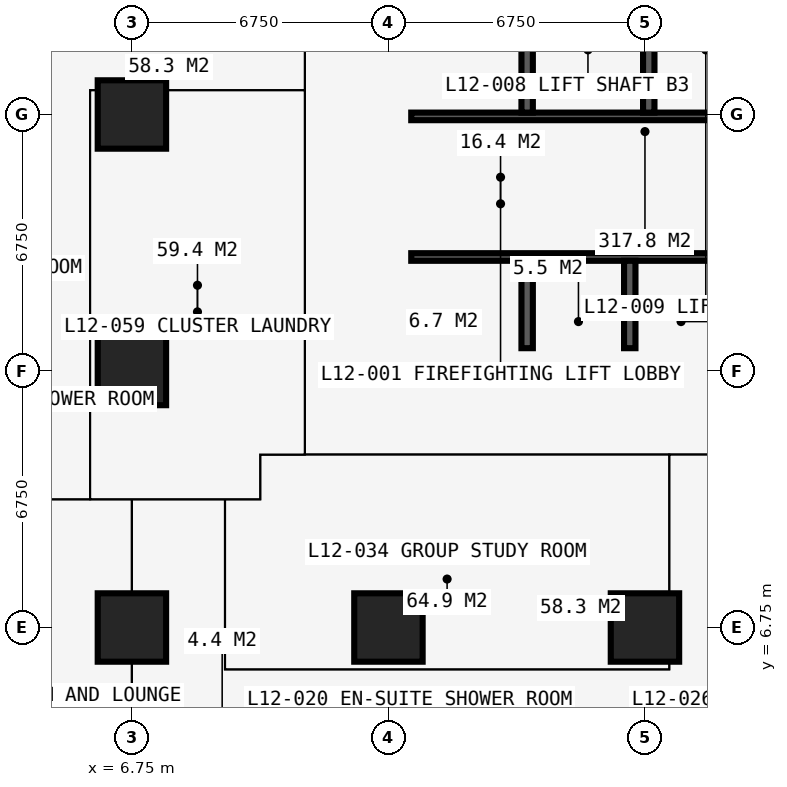
"""IFC4 building model, lengths in metres.
Left out: names, types, materials, properties, quantities, classifications, styles, units other than length and angle.
Written with IfcOpenShell. Run it as: python <this file> out.ifc"""

import sys

from ifc_helpers import new_model, si_unit, direction, frame, frame_2d, origin, origin_2d, place, context, subcontext, project, spatial, rectangle, extrude, element, fill, save


model = new_model("IFC4")
c1 = context("Model", 3, precision=1e-05, world=origin(), true_north=direction((0.0, 1.0)))
c2 = subcontext(c1, "Body", "Model", "MODEL_VIEW")
j1 = project(units=[si_unit("LENGTHUNIT", "METRE"), si_unit("PLANEANGLEUNIT", "RADIAN")], contexts=[c1])
p1 = place(None, origin())
s1 = spatial("IfcSite", under=j1, at=p1, CompositionType="ELEMENT")
p2 = place(p1, origin())
s2 = spatial("IfcBuilding", under=s1, at=p2, CompositionType="ELEMENT")
p3 = place(p2, frame((0.0, 0.0, 46.8)))
s3 = spatial("IfcBuildingStorey", under=s2, at=p3, CompositionType="ELEMENT", Elevation=46.8)
for number, where, z_axis, x_axis in (
    (1, (6.75, 6.75, 0.0), (0.0, 0.0, 1.0), (1.0, 0.0, 0.0)),
    (2, (6.75, 13.5, 0.0), (0.0, 0.0, 1.0), (1.0, 0.0, 0.0)),
    (3, (6.75, 20.25, 0.0), (0.0, 0.0, 1.0), (1.0, 0.0, 0.0)),
    (4, (13.5, 6.75, 0.0), (0.0, 0.0, 1.0), (1.0, 0.0, 0.0)),
    (5, (20.25, 6.75, 0.0), (0.0, 0.0, 1.0), (1.0, 0.0, 0.0)),
):
    element("IfcColumn", number, at=place(p3, frame(where, z_axis=z_axis, x_axis=x_axis)), inside=s3, PredefinedType="COLUMN", context=c2, shape_type="SweptSolid", body=[
        extrude(rectangle(XDim=1.8, YDim=1.8, at=origin_2d()), origin(), (0.0, 0.0, 1.0), 3.6),
    ])
p4 = place(p3, frame((12.9, 13.5, 0.0), z_axis=(0.0, 0.0, 1.0), x_axis=(1.0, 0.0, 0.0)))
e6 = element("IfcWall", 6, at=p4, inside=s3, PredefinedType="SHEAR", context=c2, shape_type="SweptSolid", body=[
    extrude(rectangle(XDim=14.7, YDim=1.2, at=frame_2d((7.35, 0.0))), origin(), (0.0, 0.0, 1.0), 3.6),
])
p5 = place(p3, frame((13.5, 26.4, 0.0), z_axis=(0.0, 0.0, 1.0), x_axis=(0.0, -1.0, 0.0)))
e7 = element("IfcWall", 7, at=p5, inside=s3, PredefinedType="SHEAR", context=c2, shape_type="SweptSolid", body=[
    extrude(rectangle(XDim=12.3, YDim=1.2, at=frame_2d((6.15, 0.0))), origin(), (0.0, 0.0, 1.0), 3.6),
])
p6 = place(p5, frame((7.45, 0.0, 0.0)))
e8 = element("IfcOpeningElement", 8, at=p6, cuts=e7, PredefinedType="OPENING", context=c2, shape_type="SweptSolid", body=[
    extrude(rectangle(XDim=1.2, YDim=2.2, at=frame_2d((0.6, 1.1))), frame((0.0, 0.61, 0.0), z_axis=(0.0, -1.0, 0.0), x_axis=(1.0, 0.0, 0.0)), (0.0, 0.0, 1.0), 1.22),
])
p7 = place(p3, frame((14.1, 16.5, 0.0), z_axis=(0.0, 0.0, 1.0), x_axis=(1.0, 0.0, 0.0)))
e9 = element("IfcWall", 9, at=p7, inside=s3, PredefinedType="SHEAR", context=c2, shape_type="SweptSolid", body=[
    extrude(rectangle(XDim=12.3, YDim=0.2, at=frame_2d((6.15, 0.0))), origin(), (0.0, 0.0, 1.0), 3.6),
])
p8 = place(p7, frame((0.9, 0.0, 0.0)))
e10 = element("IfcOpeningElement", 10, at=p8, cuts=e9, PredefinedType="OPENING", context=c2, shape_type="SweptSolid", body=[
    extrude(rectangle(XDim=1.1, YDim=2.2, at=frame_2d((0.55, 1.1))), frame((0.0, 0.11, 0.0), z_axis=(0.0, -1.0, 0.0), x_axis=(1.0, 0.0, 0.0)), (0.0, 0.0, 1.0), 0.22),
])
p9 = place(p7, frame((9.5, 0.0, 0.0)))
e11 = element("IfcOpeningElement", 11, at=p9, cuts=e9, PredefinedType="OPENING", context=c2, shape_type="SweptSolid", body=[
    extrude(rectangle(XDim=1.1, YDim=2.2, at=frame_2d((0.55, 1.1))), frame((0.0, 0.11, 0.0), z_axis=(0.0, -1.0, 0.0), x_axis=(1.0, 0.0, 0.0)), (0.0, 0.0, 1.0), 0.22),
])
p10 = place(p3, frame((14.1, 20.2, 0.0), z_axis=(0.0, 0.0, 1.0), x_axis=(1.0, 0.0, 0.0)))
e12 = element("IfcWall", 12, at=p10, inside=s3, PredefinedType="SHEAR", context=c2, shape_type="SweptSolid", body=[
    extrude(rectangle(XDim=12.3, YDim=0.2, at=frame_2d((6.15, 0.0))), origin(), (0.0, 0.0, 1.0), 3.6),
])
p11 = place(p10, frame((0.35, 0.0, 0.0)))
e13 = element("IfcOpeningElement", 13, at=p11, cuts=e12, PredefinedType="OPENING", context=c2, shape_type="SweptSolid", body=[
    extrude(rectangle(XDim=1.1, YDim=2.2, at=frame_2d((0.55, 1.1))), frame((0.0, 0.11, 0.0), z_axis=(0.0, -1.0, 0.0), x_axis=(1.0, 0.0, 0.0)), (0.0, 0.0, 1.0), 0.22),
])
p12 = place(p10, frame((9.75, 0.0, 0.0)))
e14 = element("IfcOpeningElement", 14, at=p12, cuts=e12, PredefinedType="OPENING", context=c2, shape_type="SweptSolid", body=[
    extrude(rectangle(XDim=1.1, YDim=2.2, at=frame_2d((0.55, 1.1))), frame((0.0, 0.11, 0.0), z_axis=(0.0, -1.0, 0.0), x_axis=(1.0, 0.0, 0.0)), (0.0, 0.0, 1.0), 0.22),
])
p13 = place(p3, frame((17.15, 20.3, 0.0), z_axis=(0.0, 0.0, 1.0), x_axis=(0.0, 1.0, 0.0)))
e15 = element("IfcWall", 15, at=p13, inside=s3, PredefinedType="SHEAR", context=c2, shape_type="SweptSolid", body=[
    extrude(rectangle(XDim=6.1, YDim=0.3, at=frame_2d((3.05, 0.0))), origin(), (0.0, 0.0, 1.0), 3.6),
])
p14 = place(p3, frame((20.35, 20.3, 0.0), z_axis=(0.0, 0.0, 1.0), x_axis=(0.0, 1.0, 0.0)))
e16 = element("IfcWall", 16, at=p14, inside=s3, PredefinedType="SHEAR", context=c2, shape_type="SweptSolid", body=[
    extrude(rectangle(XDim=2.8, YDim=0.3, at=frame_2d((1.4, 0.0))), origin(), (0.0, 0.0, 1.0), 3.6),
])
for number, where, z_axis, x_axis in (
    (17, (17.15, 14.1, 0.0), (0.0, 0.0, 1.0), (0.0, 1.0, 0.0)),
    (18, (19.85, 14.1, 0.0), (0.0, 0.0, 1.0), (0.0, 1.0, 0.0)),
):
    element("IfcWall", number, at=place(p3, frame(where, z_axis=z_axis, x_axis=x_axis)), inside=s3, PredefinedType="SHEAR", context=c2, shape_type="SweptSolid", body=[
        extrude(rectangle(XDim=2.3, YDim=0.3, at=frame_2d((1.15, 0.0))), origin(), (0.0, 0.0, 1.0), 3.6),
    ])
p15 = place(p3, frame((18.875, 16.6, 0.0), z_axis=(0.0, 0.0, 1.0), x_axis=(0.0, 1.0, 0.0)))
e19 = element("IfcWall", 19, at=p15, inside=s3, PredefinedType="PARTITIONING", context=c2, shape_type="SweptSolid", body=[
    extrude(rectangle(XDim=3.5, YDim=0.15, at=frame_2d((1.75, 0.0))), origin(), (0.0, 0.0, 1.0), 3.375),
])
p16 = place(p15, frame((1.15, 0.0, 0.0)))
e20 = element("IfcOpeningElement", 20, at=p16, cuts=e19, PredefinedType="OPENING", context=c2, shape_type="SweptSolid", body=[
    extrude(rectangle(XDim=1.2, YDim=2.2, at=frame_2d((0.6, 1.1))), frame((0.0, 0.085, 0.0), z_axis=(0.0, -1.0, 0.0), x_axis=(1.0, 0.0, 0.0)), (0.0, 0.0, 1.0), 0.17),
])
p17 = place(p3, frame((21.625, 16.6, 0.0), z_axis=(0.0, 0.0, 1.0), x_axis=(0.0, 1.0, 0.0)))
e21 = element("IfcWall", 21, at=p17, inside=s3, PredefinedType="PARTITIONING", context=c2, shape_type="SweptSolid", body=[
    extrude(rectangle(XDim=3.5, YDim=0.15, at=frame_2d((1.75, 0.0))), origin(), (0.0, 0.0, 1.0), 3.375),
])
p18 = place(p17, frame((1.15, 0.0, 0.0)))
e22 = element("IfcOpeningElement", 22, at=p18, cuts=e21, PredefinedType="OPENING", context=c2, shape_type="SweptSolid", body=[
    extrude(rectangle(XDim=1.2, YDim=2.2, at=frame_2d((0.6, 1.1))), frame((0.0, 0.085, 0.0), z_axis=(0.0, -1.0, 0.0), x_axis=(1.0, 0.0, 0.0)), (0.0, 0.0, 1.0), 0.17),
])
p19 = place(p3, frame((-0.734, 10.125, 0.0), z_axis=(0.0, 0.0, 1.0), x_axis=(1.0, 0.0, 0.0)))
e23 = element("IfcWall", 23, at=p19, inside=s3, PredefinedType="PARTITIONING", context=c2, shape_type="SweptSolid", body=[
    extrude(rectangle(XDim=10.859, YDim=0.15, at=frame_2d((5.429, 0.0))), origin(), (0.0, 0.0, 1.0), 3.375),
])
p20 = place(p19, frame((5.134, 0.0, 0.0)))
e24 = element("IfcOpeningElement", 24, at=p20, cuts=e23, PredefinedType="OPENING", context=c2, shape_type="SweptSolid", body=[
    extrude(rectangle(XDim=1.0, YDim=2.2, at=frame_2d((0.5, 1.1))), frame((0.0, 0.085, 0.0), z_axis=(0.0, -1.0, 0.0), x_axis=(1.0, 0.0, 0.0)), (0.0, 0.0, 1.0), 0.17),
])
p21 = place(p19, frame((8.234, 0.0, 0.0)))
e25 = element("IfcOpeningElement", 25, at=p21, cuts=e23, PredefinedType="OPENING", context=c2, shape_type="SweptSolid", body=[
    extrude(rectangle(XDim=0.95, YDim=2.2, at=frame_2d((0.475, 1.1))), frame((0.0, 0.085, 0.0), z_axis=(0.0, -1.0, 0.0), x_axis=(1.0, 0.0, 0.0)), (0.0, 0.0, 1.0), 0.17),
])
p22 = place(p3, frame((5.65, 10.125, 0.0), z_axis=(0.0, 0.0, 1.0), x_axis=(0.0, 1.0, 0.0)))
e26 = element("IfcWall", 26, at=p22, inside=s3, PredefinedType="PARTITIONING", context=c2, shape_type="SweptSolid", body=[
    extrude(rectangle(XDim=10.762, YDim=0.15, at=frame_2d((5.381, 0.0))), origin(), (0.0, 0.0, 1.0), 3.375),
])
p23 = place(p3, frame((5.65, 20.887, 0.0), z_axis=(0.0, 0.0, 1.0), x_axis=(1.0, 0.0, 0.0)))
e27 = element("IfcWall", 27, at=p23, inside=s3, PredefinedType="PARTITIONING", context=c2, shape_type="SweptSolid", body=[
    extrude(rectangle(XDim=5.65, YDim=0.15, at=frame_2d((2.825, 0.0))), origin(), (0.0, 0.0, 1.0), 3.375),
])
p24 = place(p3, frame((6.75, -0.734, 0.0), z_axis=(0.0, 0.0, 1.0), x_axis=(0.0, 1.0, 0.0)))
e28 = element("IfcWall", 28, at=p24, inside=s3, PredefinedType="PARTITIONING", context=c2, shape_type="SweptSolid", body=[
    extrude(rectangle(XDim=10.859, YDim=0.15, at=frame_2d((5.429, 0.0))), origin(), (0.0, 0.0, 1.0), 2.877),
])
p25 = place(p3, frame((9.2, 5.65, 0.0), z_axis=(0.0, 0.0, 1.0), x_axis=(0.0, 1.0, 0.0)))
e29 = element("IfcWall", 29, at=p25, inside=s3, PredefinedType="PARTITIONING", context=c2, shape_type="SweptSolid", body=[
    extrude(rectangle(XDim=4.475, YDim=0.15, at=frame_2d((2.238, 0.0))), origin(), (0.0, 0.0, 1.0), 3.375),
])
p26 = place(p3, frame((9.2, 5.65, 0.0), z_axis=(0.0, 0.0, 1.0), x_axis=(1.0, 0.0, 0.0)))
e30 = element("IfcWall", 30, at=p26, inside=s3, PredefinedType="PARTITIONING", context=c2, shape_type="SweptSolid", body=[
    extrude(rectangle(XDim=11.688, YDim=0.15, at=frame_2d((5.844, 0.0))), origin(), (0.0, 0.0, 1.0), 3.375),
])
p27 = place(p26, frame((5.35, 0.0, 0.0)))
e31 = element("IfcOpeningElement", 31, at=p27, cuts=e30, PredefinedType="OPENING", context=c2, shape_type="SweptSolid", body=[
    extrude(rectangle(XDim=0.95, YDim=2.2, at=frame_2d((0.475, 1.1))), frame((0.0, 0.085, 0.0), z_axis=(0.0, -1.0, 0.0), x_axis=(1.0, 0.0, 0.0)), (0.0, 0.0, 1.0), 0.17),
])
p28 = place(p3, frame((10.125, 10.125, 0.0), z_axis=(0.0, 0.0, 1.0), x_axis=(0.0, 1.0, 0.0)))
e32 = element("IfcWall", 32, at=p28, inside=s3, PredefinedType="PARTITIONING", context=c2, shape_type="SweptSolid", body=[
    extrude(rectangle(XDim=1.175, YDim=0.15, at=frame_2d((0.587, 0.0))), origin(), (0.0, 0.0, 1.0), 3.375),
])
p29 = place(p3, frame((10.125, 11.3, 0.0), z_axis=(0.0, 0.0, 1.0), x_axis=(1.0, 0.0, 0.0)))
e33 = element("IfcWall", 33, at=p29, inside=s3, PredefinedType="PARTITIONING", context=c2, shape_type="SweptSolid", body=[
    extrude(rectangle(XDim=20.675, YDim=0.15, at=frame_2d((10.337, 0.0))), origin(), (0.0, 0.0, 1.0), 3.375),
])
p30 = place(p29, frame((11.312, 0.0, 0.0)))
e34 = element("IfcOpeningElement", 34, at=p30, cuts=e33, PredefinedType="OPENING", context=c2, shape_type="SweptSolid", body=[
    extrude(rectangle(XDim=1.0, YDim=2.2, at=frame_2d((0.5, 1.1))), frame((0.0, 0.085, 0.0), z_axis=(0.0, -1.0, 0.0), x_axis=(1.0, 0.0, 0.0)), (0.0, 0.0, 1.0), 0.17),
])
p31 = place(p3, frame((11.3, 11.3, 0.0), z_axis=(0.0, 0.0, 1.0), x_axis=(0.0, 1.0, 0.0)))
e35 = element("IfcWall", 35, at=p31, inside=s3, PredefinedType="PARTITIONING", context=c2, shape_type="SweptSolid", body=[
    extrude(rectangle(XDim=19.075, YDim=0.15, at=frame_2d((9.538, 0.0))), origin(), (0.0, 0.0, 1.0), 3.375),
])
p32 = place(p31, frame((10.137, 0.0, 0.0)))
e36 = element("IfcOpeningElement", 36, at=p32, cuts=e35, PredefinedType="OPENING", context=c2, shape_type="SweptSolid", body=[
    extrude(rectangle(XDim=1.0, YDim=2.2, at=frame_2d((0.5, 1.1))), frame((0.0, 0.085, 0.0), z_axis=(0.0, -1.0, 0.0), x_axis=(1.0, 0.0, 0.0)), (0.0, 0.0, 1.0), 0.17),
])
p33 = place(p3, frame((20.887, 5.65, 0.0), z_axis=(0.0, 0.0, 1.0), x_axis=(0.0, 1.0, 0.0)))
e37 = element("IfcWall", 37, at=p33, inside=s3, PredefinedType="PARTITIONING", context=c2, shape_type="SweptSolid", body=[
    extrude(rectangle(XDim=5.65, YDim=0.15, at=frame_2d((2.825, 0.0))), origin(), (0.0, 0.0, 1.0), 3.375),
])
p34 = place(p8, origin())
e38 = element("IfcDoor", 38, at=p34, inside=s3, OperationType="DOUBLE_DOOR_SLIDING", PredefinedType="DOOR", context=c2, shape_type="SweptSolid", body=[
    extrude(rectangle(XDim=1.1, YDim=2.2, at=frame_2d((0.55, 1.1))), frame((0.0, 0.025, 0.0), z_axis=(0.0, -1.0, 0.0), x_axis=(1.0, 0.0, 0.0)), (0.0, 0.0, 1.0), 0.05),
])
fill(e10, e38)
p35 = place(p6, origin())
e39 = element("IfcDoor", 39, at=p35, inside=s3, OperationType="DOUBLE_DOOR_SINGLE_SWING", PredefinedType="DOOR", context=c2, shape_type="SweptSolid", body=[
    extrude(rectangle(XDim=1.2, YDim=2.2, at=frame_2d((0.6, 1.1))), frame((0.0, 0.025, 0.0), z_axis=(0.0, -1.0, 0.0), x_axis=(1.0, 0.0, 0.0)), (0.0, 0.0, 1.0), 0.05),
])
fill(e8, e39)
p36 = place(p16, origin())
e40 = element("IfcDoor", 40, at=p36, inside=s3, OperationType="DOUBLE_DOOR_SINGLE_SWING", PredefinedType="DOOR", context=c2, shape_type="SweptSolid", body=[
    extrude(rectangle(XDim=1.2, YDim=2.2, at=frame_2d((0.6, 1.1))), frame((0.0, 0.025, 0.0), z_axis=(0.0, -1.0, 0.0), x_axis=(1.0, 0.0, 0.0)), (0.0, 0.0, 1.0), 0.05),
])
fill(e20, e40)
p37 = place(p18, origin())
e41 = element("IfcDoor", 41, at=p37, inside=s3, OperationType="DOUBLE_DOOR_SINGLE_SWING", PredefinedType="DOOR", context=c2, shape_type="SweptSolid", body=[
    extrude(rectangle(XDim=1.2, YDim=2.2, at=frame_2d((0.6, 1.1))), frame((0.0, 0.025, 0.0), z_axis=(0.0, -1.0, 0.0), x_axis=(1.0, 0.0, 0.0)), (0.0, 0.0, 1.0), 0.05),
])
fill(e22, e41)
p38 = place(p11, origin())
e42 = element("IfcDoor", 42, at=p38, inside=s3, OperationType="SINGLE_SWING_LEFT", PredefinedType="DOOR", context=c2, shape_type="SweptSolid", body=[
    extrude(rectangle(XDim=1.1, YDim=2.2, at=frame_2d((0.55, 1.1))), frame((0.0, 0.025, 0.0), z_axis=(0.0, -1.0, 0.0), x_axis=(1.0, 0.0, 0.0)), (0.0, 0.0, 1.0), 0.05),
])
fill(e13, e42)
p39 = place(p20, origin())
e43 = element("IfcDoor", 43, at=p39, inside=s3, OperationType="SINGLE_SWING_LEFT", PredefinedType="DOOR", context=c2, shape_type="SweptSolid", body=[
    extrude(rectangle(XDim=1.0, YDim=2.2, at=frame_2d((0.5, 1.1))), frame((0.0, 0.025, 0.0), z_axis=(0.0, -1.0, 0.0), x_axis=(1.0, 0.0, 0.0)), (0.0, 0.0, 1.0), 0.05),
])
fill(e24, e43)
p40 = place(p30, origin())
e44 = element("IfcDoor", 44, at=p40, inside=s3, OperationType="SINGLE_SWING_LEFT", PredefinedType="DOOR", context=c2, shape_type="SweptSolid", body=[
    extrude(rectangle(XDim=1.0, YDim=2.2, at=frame_2d((0.5, 1.1))), frame((0.0, 0.025, 0.0), z_axis=(0.0, -1.0, 0.0), x_axis=(1.0, 0.0, 0.0)), (0.0, 0.0, 1.0), 0.05),
])
fill(e34, e44)
p41 = place(p27, origin())
e45 = element("IfcDoor", 45, at=p41, inside=s3, OperationType="SINGLE_SWING_LEFT", PredefinedType="DOOR", context=c2, shape_type="SweptSolid", body=[
    extrude(rectangle(XDim=0.95, YDim=2.2, at=frame_2d((0.475, 1.1))), frame((0.0, 0.025, 0.0), z_axis=(0.0, -1.0, 0.0), x_axis=(1.0, 0.0, 0.0)), (0.0, 0.0, 1.0), 0.05),
])
fill(e31, e45)
p42 = place(p32, origin())
e46 = element("IfcDoor", 46, at=p42, inside=s3, OperationType="SINGLE_SWING_LEFT", PredefinedType="DOOR", context=c2, shape_type="SweptSolid", body=[
    extrude(rectangle(XDim=1.0, YDim=2.2, at=frame_2d((0.5, 1.1))), frame((0.0, 0.025, 0.0), z_axis=(0.0, -1.0, 0.0), x_axis=(1.0, 0.0, 0.0)), (0.0, 0.0, 1.0), 0.05),
])
fill(e36, e46)
p43 = place(p21, origin())
e47 = element("IfcDoor", 47, at=p43, inside=s3, OperationType="SINGLE_SWING_LEFT", PredefinedType="DOOR", context=c2, shape_type="SweptSolid", body=[
    extrude(rectangle(XDim=0.95, YDim=2.2, at=frame_2d((0.475, 1.1))), frame((0.0, 0.025, 0.0), z_axis=(0.0, -1.0, 0.0), x_axis=(1.0, 0.0, 0.0)), (0.0, 0.0, 1.0), 0.05),
])
fill(e25, e47)
save(model, sys.argv[1])
